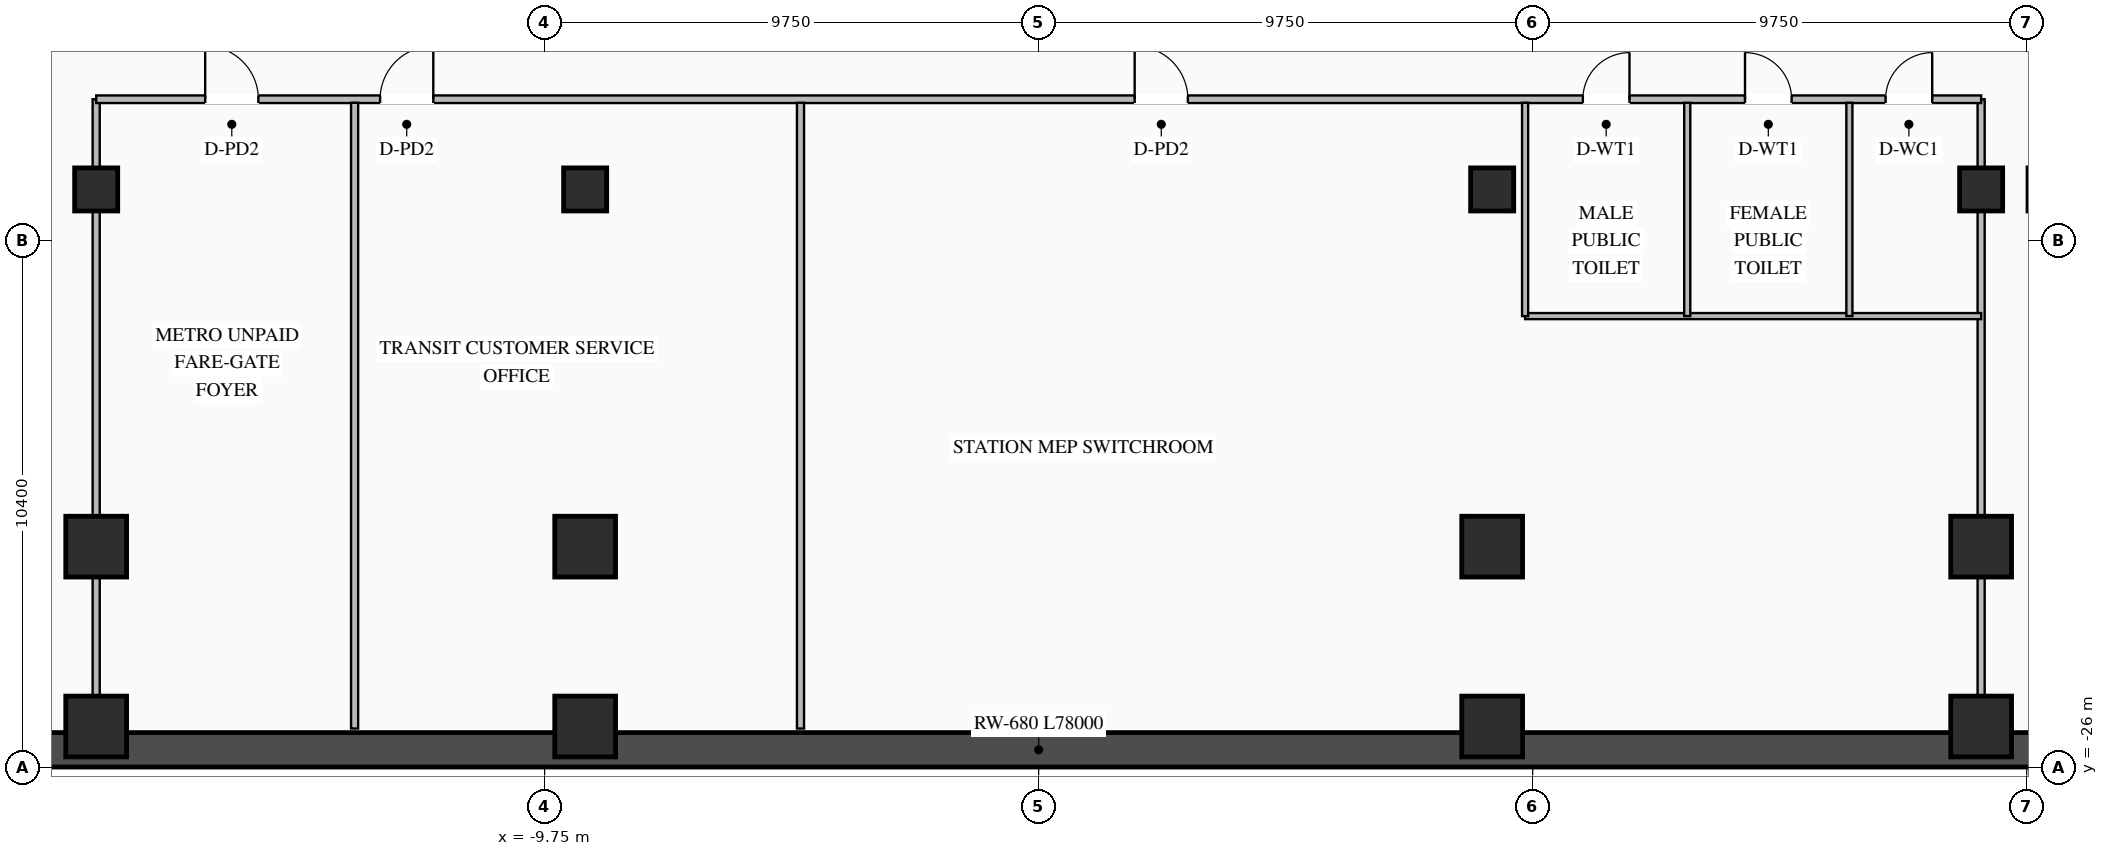
"""IFC4 building model, lengths in metres.
Left out: names, types, materials, properties, quantities, classifications, styles, units other than length and angle.
Written with IfcOpenShell. Run it as: python <this file> out.ifc"""

import sys

from ifc_helpers import new_model, si_unit, direction, frame, frame_2d, origin, origin_2d, place, context, subcontext, project, spatial, rectangle, i_section, extrude, element, fill, save


model = new_model("IFC4")
c1 = context("Model", 3, precision=1e-05, world=origin(), true_north=direction((0.0, 1.0)))
c2 = subcontext(c1, "Body", "Model", "MODEL_VIEW")
j1 = project(units=[si_unit("LENGTHUNIT", "METRE"), si_unit("PLANEANGLEUNIT", "RADIAN")], contexts=[c1])
p1 = place(None, origin())
s1 = spatial("IfcSite", under=j1, at=p1, CompositionType="ELEMENT")
p2 = place(p1, origin())
s2 = spatial("IfcBuilding", under=s1, at=p2, CompositionType="ELEMENT")
p3 = place(p2, frame((0.0, 0.0, -4.8)))
s3 = spatial("IfcBuildingStorey", under=s2, at=p3, CompositionType="ELEMENT", Elevation=-4.8)
p4 = place(p3, frame((-39.0, -25.66, 0.0), z_axis=(0.0, 0.0, 1.0), x_axis=(1.0, 0.0, 0.0)))
e1 = element("IfcWall", 1, at=p4, inside=s3, PredefinedType="SOLIDWALL", context=c2, shape_type="SweptSolid", body=[
    extrude(rectangle(XDim=78.0, YDim=0.68, at=frame_2d((39.0, 0.0))), origin(), (0.0, 0.0, 1.0), 4.45),
])
for number, where, z_axis, x_axis in (
    (2, (-18.6, -14.6, 0.0), (0.0, 0.0, 1.0), (1.0, 0.0, 0.0)),
    (3, (-8.95, -14.6, 0.0), (0.0, 0.0, 1.0), (1.0, 0.0, 0.0)),
    (4, (8.95, -14.6, 0.0), (0.0, 0.0, 1.0), (1.0, 0.0, 0.0)),
    (5, (18.6, -14.6, 0.0), (0.0, 0.0, 1.0), (1.0, 0.0, 0.0)),
    (6, (19.95, -14.6, 0.0), (0.0, 0.0, 1.0), (1.0, 0.0, 0.0)),
):
    element("IfcColumn", number, at=place(p3, frame(where, z_axis=z_axis, x_axis=x_axis)), inside=s3, PredefinedType="COLUMN", context=c2, shape_type="SweptSolid", body=[
        extrude(i_section(OverallWidth=0.85, OverallDepth=0.85, WebThickness=0.032, FlangeThickness=0.048, at=origin_2d()), origin(), (0.0, 0.0, 1.0), 4.8),
    ])
for number, where, z_axis, x_axis in (
    (7, (-18.6, -21.65, 0.0), (0.0, 0.0, 1.0), (1.0, 0.0, 0.0)),
    (8, (-8.95, -21.65, 0.0), (0.0, 0.0, 1.0), (1.0, 0.0, 0.0)),
    (9, (8.95, -21.65, 0.0), (0.0, 0.0, 1.0), (1.0, 0.0, 0.0)),
    (10, (18.6, -21.65, 0.0), (0.0, 0.0, 1.0), (1.0, 0.0, 0.0)),
    (11, (-18.6, -25.2, 0.0), (0.0, 0.0, 1.0), (1.0, 0.0, 0.0)),
    (12, (-8.95, -25.2, 0.0), (0.0, 0.0, 1.0), (1.0, 0.0, 0.0)),
    (13, (8.95, -25.2, 0.0), (0.0, 0.0, 1.0), (1.0, 0.0, 0.0)),
    (14, (18.6, -25.2, 0.0), (0.0, 0.0, 1.0), (1.0, 0.0, 0.0)),
):
    element("IfcColumn", number, at=place(p3, frame(where, z_axis=z_axis, x_axis=x_axis)), inside=s3, PredefinedType="COLUMN", context=c2, shape_type="SweptSolid", body=[
        extrude(rectangle(XDim=1.2, YDim=1.2, at=origin_2d()), origin(), (0.0, 0.0, 1.0), 4.8),
    ])
for number, where, z_axis, x_axis in (
    (15, (-18.6, -25.24, 0.0), (0.0, 0.0, 1.0), (0.0, 1.0, 0.0)),
    (16, (18.6, -25.24, 0.0), (0.0, 0.0, 1.0), (0.0, 1.0, 0.0)),
):
    element("IfcWall", number, at=place(p3, frame(where, z_axis=z_axis, x_axis=x_axis)), inside=s3, PredefinedType="STANDARD", context=c2, shape_type="SweptSolid", body=[
        extrude(rectangle(XDim=12.42, YDim=0.14, at=frame_2d((6.21, 0.0))), origin(), (0.0, 0.0, 1.0), 3.625),
    ])
p5 = place(p3, frame((-18.6, -12.82, 0.0), z_axis=(0.0, 0.0, 1.0), x_axis=(1.0, 0.0, 0.0)))
e17 = element("IfcWall", 17, at=p5, inside=s3, PredefinedType="STANDARD", context=c2, shape_type="SweptSolid", body=[
    extrude(rectangle(XDim=37.2, YDim=0.15, at=frame_2d((18.6, 0.0))), origin(), (0.0, 0.0, 1.0), 4.43),
])
p6 = place(p5, frame((29.34, 0.0, 0.0)))
e18 = element("IfcOpeningElement", 18, at=p6, cuts=e17, PredefinedType="OPENING", context=c2, shape_type="SweptSolid", body=[
    extrude(rectangle(XDim=0.92, YDim=2.08, at=frame_2d((0.46, 1.04))), frame((0.0, 0.085, 0.0), z_axis=(0.0, -1.0, 0.0), x_axis=(1.0, 0.0, 0.0)), (0.0, 0.0, 1.0), 0.17),
])
p7 = place(p5, frame((32.54, 0.0, 0.0)))
e19 = element("IfcOpeningElement", 19, at=p7, cuts=e17, PredefinedType="OPENING", context=c2, shape_type="SweptSolid", body=[
    extrude(rectangle(XDim=0.92, YDim=2.08, at=frame_2d((0.46, 1.04))), frame((0.0, 0.085, 0.0), z_axis=(0.0, -1.0, 0.0), x_axis=(1.0, 0.0, 0.0)), (0.0, 0.0, 1.0), 0.17),
])
p8 = place(p5, frame((35.314, 0.0, 0.0)))
e20 = element("IfcOpeningElement", 20, at=p8, cuts=e17, PredefinedType="OPENING", context=c2, shape_type="SweptSolid", body=[
    extrude(rectangle(XDim=0.92, YDim=2.08, at=frame_2d((0.46, 1.04))), frame((0.0, 0.085, 0.0), z_axis=(0.0, -1.0, 0.0), x_axis=(1.0, 0.0, 0.0)), (0.0, 0.0, 1.0), 0.17),
])
p9 = place(p5, frame((2.151, 0.0, 0.0)))
e21 = element("IfcOpeningElement", 21, at=p9, cuts=e17, PredefinedType="OPENING", context=c2, shape_type="SweptSolid", body=[
    extrude(rectangle(XDim=1.05, YDim=2.08, at=frame_2d((0.525, 1.04))), frame((0.0, 0.085, 0.0), z_axis=(0.0, -1.0, 0.0), x_axis=(1.0, 0.0, 0.0)), (0.0, 0.0, 1.0), 0.17),
])
p10 = place(p5, frame((5.603, 0.0, 0.0)))
e22 = element("IfcOpeningElement", 22, at=p10, cuts=e17, PredefinedType="OPENING", context=c2, shape_type="SweptSolid", body=[
    extrude(rectangle(XDim=1.05, YDim=2.08, at=frame_2d((0.525, 1.04))), frame((0.0, 0.085, 0.0), z_axis=(0.0, -1.0, 0.0), x_axis=(1.0, 0.0, 0.0)), (0.0, 0.0, 1.0), 0.17),
])
p11 = place(p5, frame((20.495, 0.0, 0.0)))
e23 = element("IfcOpeningElement", 23, at=p11, cuts=e17, PredefinedType="OPENING", context=c2, shape_type="SweptSolid", body=[
    extrude(rectangle(XDim=1.05, YDim=2.08, at=frame_2d((0.525, 1.04))), frame((0.0, 0.085, 0.0), z_axis=(0.0, -1.0, 0.0), x_axis=(1.0, 0.0, 0.0)), (0.0, 0.0, 1.0), 0.17),
])
p12 = place(p3, frame((9.6, -17.1, 0.0), z_axis=(0.0, 0.0, 1.0), x_axis=(1.0, 0.0, 0.0)))
e24 = element("IfcWall", 24, at=p12, inside=s3, PredefinedType="STANDARD", context=c2, shape_type="SweptSolid", body=[
    extrude(rectangle(XDim=9.0, YDim=0.12, at=frame_2d((4.5, 0.0))), origin(), (0.0, 0.0, 1.0), 4.43),
])
for number, where, z_axis, x_axis in (
    (25, (9.6, -17.1, 0.0), (0.0, 0.0, 1.0), (0.0, 1.0, 0.0)),
    (26, (12.8, -17.1, 0.0), (0.0, 0.0, 1.0), (0.0, 1.0, 0.0)),
    (27, (16.0, -17.1, 0.0), (0.0, 0.0, 1.0), (0.0, 1.0, 0.0)),
):
    element("IfcWall", number, at=place(p3, frame(where, z_axis=z_axis, x_axis=x_axis)), inside=s3, PredefinedType="STANDARD", context=c2, shape_type="SweptSolid", body=[
        extrude(rectangle(XDim=4.21, YDim=0.12, at=frame_2d((2.105, 0.0))), origin(), (0.0, 0.0, 1.0), 4.43),
    ])
for number, where, z_axis, x_axis in (
    (28, (-13.5, -25.24, 0.0), (0.0, 0.0, 1.0), (0.0, 1.0, 0.0)),
    (29, (-4.7, -25.24, 0.0), (0.0, 0.0, 1.0), (0.0, 1.0, 0.0)),
):
    element("IfcWall", number, at=place(p3, frame(where, z_axis=z_axis, x_axis=x_axis)), inside=s3, PredefinedType="STANDARD", context=c2, shape_type="SweptSolid", body=[
        extrude(rectangle(XDim=12.35, YDim=0.14, at=frame_2d((6.175, 0.0))), origin(), (0.0, 0.0, 1.0), 4.43),
    ])
p13 = place(p6, origin())
e30 = element("IfcDoor", 30, at=p13, inside=s3, OperationType="SINGLE_SWING_RIGHT", PredefinedType="DOOR", context=c2, shape_type="SweptSolid", body=[
    extrude(rectangle(XDim=0.92, YDim=2.08, at=frame_2d((0.46, 1.04))), frame((0.0, 0.025, 0.0), z_axis=(0.0, -1.0, 0.0), x_axis=(1.0, 0.0, 0.0)), (0.0, 0.0, 1.0), 0.05),
])
fill(e18, e30)
p14 = place(p7, origin())
e31 = element("IfcDoor", 31, at=p14, inside=s3, OperationType="SINGLE_SWING_LEFT", PredefinedType="DOOR", context=c2, shape_type="SweptSolid", body=[
    extrude(rectangle(XDim=0.92, YDim=2.08, at=frame_2d((0.46, 1.04))), frame((0.0, 0.025, 0.0), z_axis=(0.0, -1.0, 0.0), x_axis=(1.0, 0.0, 0.0)), (0.0, 0.0, 1.0), 0.05),
])
fill(e19, e31)
p15 = place(p8, origin())
e32 = element("IfcDoor", 32, at=p15, inside=s3, OperationType="SINGLE_SWING_RIGHT", PredefinedType="DOOR", context=c2, shape_type="SweptSolid", body=[
    extrude(rectangle(XDim=0.92, YDim=2.08, at=frame_2d((0.46, 1.04))), frame((0.0, 0.025, 0.0), z_axis=(0.0, -1.0, 0.0), x_axis=(1.0, 0.0, 0.0)), (0.0, 0.0, 1.0), 0.05),
])
fill(e20, e32)
p16 = place(p9, origin())
e33 = element("IfcDoor", 33, at=p16, inside=s3, OperationType="SINGLE_SWING_LEFT", PredefinedType="DOOR", context=c2, shape_type="SweptSolid", body=[
    extrude(rectangle(XDim=1.05, YDim=2.08, at=frame_2d((0.525, 1.04))), frame((0.0, 0.025, 0.0), z_axis=(0.0, -1.0, 0.0), x_axis=(1.0, 0.0, 0.0)), (0.0, 0.0, 1.0), 0.05),
])
fill(e21, e33)
p17 = place(p10, origin())
e34 = element("IfcDoor", 34, at=p17, inside=s3, OperationType="SINGLE_SWING_RIGHT", PredefinedType="DOOR", context=c2, shape_type="SweptSolid", body=[
    extrude(rectangle(XDim=1.05, YDim=2.08, at=frame_2d((0.525, 1.04))), frame((0.0, 0.025, 0.0), z_axis=(0.0, -1.0, 0.0), x_axis=(1.0, 0.0, 0.0)), (0.0, 0.0, 1.0), 0.05),
])
fill(e22, e34)
p18 = place(p11, origin())
e35 = element("IfcDoor", 35, at=p18, inside=s3, OperationType="SINGLE_SWING_LEFT", PredefinedType="DOOR", context=c2, shape_type="SweptSolid", body=[
    extrude(rectangle(XDim=1.05, YDim=2.08, at=frame_2d((0.525, 1.04))), frame((0.0, 0.025, 0.0), z_axis=(0.0, -1.0, 0.0), x_axis=(1.0, 0.0, 0.0)), (0.0, 0.0, 1.0), 0.05),
])
fill(e23, e35)
save(model, sys.argv[1])
